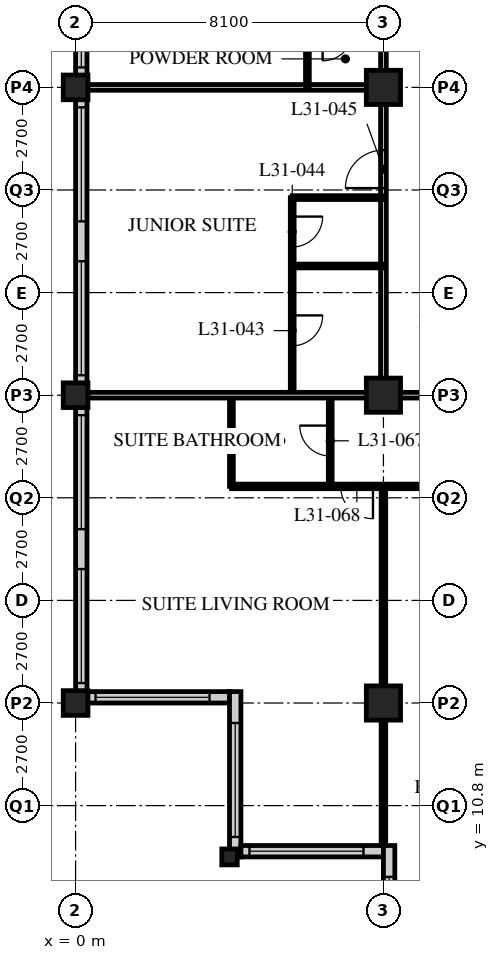
"""IFC4 building model, lengths in metres.
Left out: names, types, materials, properties, quantities, classifications, styles, units other than length and angle.
Written with IfcOpenShell. Run it as: python <this file> out.ifc"""

import sys

from ifc_helpers import new_model, si_unit, direction, frame, frame_2d, origin, origin_2d, place, context, subcontext, project, spatial, rectangle, hollow_rectangle, i_section, extrude, element, fill, save


model = new_model("IFC4")
c1 = context("Model", 3, precision=1e-05, world=origin(), true_north=direction((0.0, 1.0)))
c2 = subcontext(c1, "Body", "Model", "MODEL_VIEW")
j1 = project(units=[si_unit("LENGTHUNIT", "METRE"), si_unit("PLANEANGLEUNIT", "RADIAN")], contexts=[c1])
p1 = place(None, origin())
s1 = spatial("IfcSite", under=j1, at=p1, CompositionType="ELEMENT")
p2 = place(p1, origin())
s2 = spatial("IfcBuilding", under=s1, at=p2, CompositionType="ELEMENT")
p3 = place(p2, frame((0.0, 0.0, 123.8)))
s3 = spatial("IfcBuildingStorey", under=s2, at=p3, CompositionType="ELEMENT", Elevation=123.8)
for number, where, z_axis, x_axis in (
    (1, (0.0, 13.5, 0.0), (0.0, 0.0, 1.0), (1.0, 0.0, 0.0)),
    (2, (0.0, 21.6, 0.0), (0.0, 0.0, 1.0), (1.0, 0.0, 0.0)),
    (3, (0.0, 29.7, 0.0), (0.0, 0.0, 1.0), (1.0, 0.0, 0.0)),
):
    element("IfcColumn", number, at=place(p3, frame(where, z_axis=z_axis, x_axis=x_axis)), inside=s3, PredefinedType="COLUMN", context=c2, shape_type="SweptSolid", body=[
        extrude(hollow_rectangle(XDim=0.65, YDim=0.65, WallThickness=0.055, at=origin_2d()), origin(), (0.0, 0.0, 1.0), 3.4),
    ])
p4 = place(p3, frame((4.05, 9.45, 0.0), z_axis=(0.0, 0.0, 1.0), x_axis=(1.0, 0.0, 0.0)))
e4 = element("IfcColumn", 4, at=p4, inside=s3, PredefinedType="COLUMN", context=c2, shape_type="SweptSolid", body=[
    extrude(i_section(OverallWidth=0.407, OverallDepth=0.419, WebThickness=0.031, FlangeThickness=0.049, FilletRadius=0.015, at=origin_2d()), origin(), (0.0, 0.0, 1.0), 3.4),
])
for number, where, z_axis, x_axis in (
    (5, (8.1, 13.5, 0.0), (0.0, 0.0, 1.0), (1.0, 0.0, 0.0)),
    (6, (8.1, 21.6, 0.0), (0.0, 0.0, 1.0), (1.0, 0.0, 0.0)),
    (7, (8.1, 29.7, 0.0), (0.0, 0.0, 1.0), (1.0, 0.0, 0.0)),
):
    element("IfcColumn", number, at=place(p3, frame(where, z_axis=z_axis, x_axis=x_axis)), inside=s3, PredefinedType="COLUMN", context=c2, shape_type="SweptSolid", body=[
        extrude(hollow_rectangle(XDim=0.9, YDim=0.9, WallThickness=0.09, at=origin_2d()), origin(), (0.0, 0.0, 1.0), 3.4),
    ])
p5 = place(p3, frame((0.15, 45.6, 0.0), z_axis=(0.0, 0.0, 1.0), x_axis=(0.0, -1.0, 0.0)))
e8 = element("IfcWall", 8, at=p5, inside=s3, PredefinedType="SOLIDWALL", context=c2, shape_type="SweptSolid", body=[
    extrude(rectangle(XDim=32.1, YDim=0.3, at=frame_2d((16.05, 0.0))), origin(), (0.0, 0.0, 1.0), 3.19),
])
p6 = place(p5, frame((0.225, 0.0, 0.9)))
e9 = element("IfcOpeningElement", 9, at=p6, cuts=e8, PredefinedType="OPENING", context=c2, shape_type="SweptSolid", body=[
    extrude(rectangle(XDim=3.0, YDim=2.0, at=frame_2d((1.5, 1.0))), frame((0.0, 0.16, 0.0), z_axis=(0.0, -1.0, 0.0), x_axis=(1.0, 0.0, 0.0)), (0.0, 0.0, 1.0), 0.32),
])
p7 = place(p5, frame((4.275, 0.0, 0.9)))
e10 = element("IfcOpeningElement", 10, at=p7, cuts=e8, PredefinedType="OPENING", context=c2, shape_type="SweptSolid", body=[
    extrude(rectangle(XDim=3.0, YDim=2.0, at=frame_2d((1.5, 1.0))), frame((0.0, 0.16, 0.0), z_axis=(0.0, -1.0, 0.0), x_axis=(1.0, 0.0, 0.0)), (0.0, 0.0, 1.0), 0.32),
])
p8 = place(p5, frame((8.325, 0.0, 0.9)))
e11 = element("IfcOpeningElement", 11, at=p8, cuts=e8, PredefinedType="OPENING", context=c2, shape_type="SweptSolid", body=[
    extrude(rectangle(XDim=3.0, YDim=2.0, at=frame_2d((1.5, 1.0))), frame((0.0, 0.16, 0.0), z_axis=(0.0, -1.0, 0.0), x_axis=(1.0, 0.0, 0.0)), (0.0, 0.0, 1.0), 0.32),
])
p9 = place(p5, frame((12.375, 0.0, 0.9)))
e12 = element("IfcOpeningElement", 12, at=p9, cuts=e8, PredefinedType="OPENING", context=c2, shape_type="SweptSolid", body=[
    extrude(rectangle(XDim=3.0, YDim=2.0, at=frame_2d((1.5, 1.0))), frame((0.0, 0.16, 0.0), z_axis=(0.0, -1.0, 0.0), x_axis=(1.0, 0.0, 0.0)), (0.0, 0.0, 1.0), 0.32),
])
p10 = place(p5, frame((16.425, 0.0, 0.9)))
e13 = element("IfcOpeningElement", 13, at=p10, cuts=e8, PredefinedType="OPENING", context=c2, shape_type="SweptSolid", body=[
    extrude(rectangle(XDim=3.0, YDim=2.0, at=frame_2d((1.5, 1.0))), frame((0.0, 0.16, 0.0), z_axis=(0.0, -1.0, 0.0), x_axis=(1.0, 0.0, 0.0)), (0.0, 0.0, 1.0), 0.32),
])
p11 = place(p5, frame((20.475, 0.0, 0.9)))
e14 = element("IfcOpeningElement", 14, at=p11, cuts=e8, PredefinedType="OPENING", context=c2, shape_type="SweptSolid", body=[
    extrude(rectangle(XDim=3.0, YDim=2.0, at=frame_2d((1.5, 1.0))), frame((0.0, 0.16, 0.0), z_axis=(0.0, -1.0, 0.0), x_axis=(1.0, 0.0, 0.0)), (0.0, 0.0, 1.0), 0.32),
])
p12 = place(p5, frame((24.525, 0.0, 0.9)))
e15 = element("IfcOpeningElement", 15, at=p12, cuts=e8, PredefinedType="OPENING", context=c2, shape_type="SweptSolid", body=[
    extrude(rectangle(XDim=3.0, YDim=2.0, at=frame_2d((1.5, 1.0))), frame((0.0, 0.16, 0.0), z_axis=(0.0, -1.0, 0.0), x_axis=(1.0, 0.0, 0.0)), (0.0, 0.0, 1.0), 0.32),
])
p13 = place(p5, frame((28.575, 0.0, 0.9)))
e16 = element("IfcOpeningElement", 16, at=p13, cuts=e8, PredefinedType="OPENING", context=c2, shape_type="SweptSolid", body=[
    extrude(rectangle(XDim=3.0, YDim=2.0, at=frame_2d((1.5, 1.0))), frame((0.0, 0.16, 0.0), z_axis=(0.0, -1.0, 0.0), x_axis=(1.0, 0.0, 0.0)), (0.0, 0.0, 1.0), 0.32),
])
p14 = place(p3, frame((0.3, 13.65, 0.0), z_axis=(0.0, 0.0, 1.0), x_axis=(1.0, 0.0, 0.0)))
e17 = element("IfcWall", 17, at=p14, inside=s3, PredefinedType="SOLIDWALL", context=c2, shape_type="SweptSolid", body=[
    extrude(rectangle(XDim=3.75, YDim=0.3, at=frame_2d((1.875, 0.0))), origin(), (0.0, 0.0, 1.0), 3.19),
])
p15 = place(p14, frame((0.225, 0.0, 0.9)))
e18 = element("IfcOpeningElement", 18, at=p15, cuts=e17, PredefinedType="OPENING", context=c2, shape_type="SweptSolid", body=[
    extrude(rectangle(XDim=3.0, YDim=1.5, at=frame_2d((1.5, 0.75))), frame((0.0, 0.16, 0.0), z_axis=(0.0, -1.0, 0.0), x_axis=(1.0, 0.0, 0.0)), (0.0, 0.0, 1.0), 0.32),
])
p16 = place(p3, frame((4.2, 13.8, 0.0), z_axis=(0.0, 0.0, 1.0), x_axis=(0.0, -1.0, 0.0)))
e19 = element("IfcWall", 19, at=p16, inside=s3, PredefinedType="SOLIDWALL", context=c2, shape_type="SweptSolid", body=[
    extrude(rectangle(XDim=4.35, YDim=0.3, at=frame_2d((2.175, 0.0))), origin(), (0.0, 0.0, 1.0), 3.19),
])
p17 = place(p16, frame((0.825, 0.0, 0.9)))
e20 = element("IfcOpeningElement", 20, at=p17, cuts=e19, PredefinedType="OPENING", context=c2, shape_type="SweptSolid", body=[
    extrude(rectangle(XDim=3.0, YDim=1.5, at=frame_2d((1.5, 0.75))), frame((0.0, 0.16, 0.0), z_axis=(0.0, -1.0, 0.0), x_axis=(1.0, 0.0, 0.0)), (0.0, 0.0, 1.0), 0.32),
])
p18 = place(p3, frame((4.35, 9.6, 0.0), z_axis=(0.0, 0.0, 1.0), x_axis=(1.0, 0.0, 0.0)))
e21 = element("IfcWall", 21, at=p18, inside=s3, PredefinedType="SOLIDWALL", context=c2, shape_type="SweptSolid", body=[
    extrude(rectangle(XDim=3.75, YDim=0.3, at=frame_2d((1.875, 0.0))), origin(), (0.0, 0.0, 1.0), 3.19),
])
p19 = place(p18, frame((0.225, 0.0, 0.9)))
e22 = element("IfcOpeningElement", 22, at=p19, cuts=e21, PredefinedType="OPENING", context=c2, shape_type="SweptSolid", body=[
    extrude(rectangle(XDim=3.0, YDim=1.5, at=frame_2d((1.5, 0.75))), frame((0.0, 0.16, 0.0), z_axis=(0.0, -1.0, 0.0), x_axis=(1.0, 0.0, 0.0)), (0.0, 0.0, 1.0), 0.32),
])
p20 = place(p3, frame((8.25, 9.75, 0.0), z_axis=(0.0, 0.0, 1.0), x_axis=(0.0, -1.0, 0.0)))
e23 = element("IfcWall", 23, at=p20, inside=s3, PredefinedType="SOLIDWALL", context=c2, shape_type="SweptSolid", body=[
    extrude(rectangle(XDim=4.35, YDim=0.3, at=frame_2d((2.175, 0.0))), origin(), (0.0, 0.0, 1.0), 3.19),
])
p21 = place(p20, frame((0.825, 0.0, 0.9)))
e24 = element("IfcOpeningElement", 24, at=p21, cuts=e23, PredefinedType="OPENING", context=c2, shape_type="SweptSolid", body=[
    extrude(rectangle(XDim=3.0, YDim=1.5, at=frame_2d((1.5, 0.75))), frame((0.0, 0.16, 0.0), z_axis=(0.0, -1.0, 0.0), x_axis=(1.0, 0.0, 0.0)), (0.0, 0.0, 1.0), 0.32),
])
p22 = place(p3, frame((8.1, 21.6, 0.0), z_axis=(0.0, 0.0, 1.0), x_axis=(1.0, 0.0, 0.0)))
e25 = element("IfcWall", 25, at=p22, inside=s3, PredefinedType="PARTITIONING", context=c2, shape_type="SweptSolid", body=[
    extrude(rectangle(XDim=40.5, YDim=0.15, at=frame_2d((20.25, 0.0))), origin(), (0.0, 0.0, 1.0), 2.578),
])
p23 = place(p22, frame((9.625, 0.0, 0.0)))
e26 = element("IfcOpeningElement", 26, at=p23, cuts=e25, PredefinedType="OPENING", context=c2, shape_type="SweptSolid", body=[
    extrude(rectangle(XDim=1.0, YDim=2.1, at=frame_2d((0.5, 1.05))), frame((0.0, 0.085, 0.0), z_axis=(0.0, -1.0, 0.0), x_axis=(1.0, 0.0, 0.0)), (0.0, 0.0, 1.0), 0.17),
])
p24 = place(p22, frame((21.775, 0.0, 0.0)))
e27 = element("IfcOpeningElement", 27, at=p24, cuts=e25, PredefinedType="OPENING", context=c2, shape_type="SweptSolid", body=[
    extrude(rectangle(XDim=1.0, YDim=2.1, at=frame_2d((0.5, 1.05))), frame((0.0, 0.085, 0.0), z_axis=(0.0, -1.0, 0.0), x_axis=(1.0, 0.0, 0.0)), (0.0, 0.0, 1.0), 0.17),
])
p25 = place(p22, frame((28.95, 0.0, 0.0)))
e28 = element("IfcOpeningElement", 28, at=p25, cuts=e25, PredefinedType="OPENING", context=c2, shape_type="SweptSolid", body=[
    extrude(rectangle(XDim=1.0, YDim=2.1, at=frame_2d((0.5, 1.05))), frame((0.0, 0.085, 0.0), z_axis=(0.0, -1.0, 0.0), x_axis=(1.0, 0.0, 0.0)), (0.0, 0.0, 1.0), 0.17),
])
p26 = place(p22, frame((34.85, 0.0, 0.0)))
e29 = element("IfcOpeningElement", 29, at=p26, cuts=e25, PredefinedType="OPENING", context=c2, shape_type="SweptSolid", body=[
    extrude(rectangle(XDim=1.0, YDim=2.1, at=frame_2d((0.5, 1.05))), frame((0.0, 0.085, 0.0), z_axis=(0.0, -1.0, 0.0), x_axis=(1.0, 0.0, 0.0)), (0.0, 0.0, 1.0), 0.17),
])
p27 = place(p22, frame((1.525, 0.0, 0.0)))
e30 = element("IfcOpeningElement", 30, at=p27, cuts=e25, PredefinedType="OPENING", context=c2, shape_type="SweptSolid", body=[
    extrude(rectangle(XDim=1.0, YDim=2.1, at=frame_2d((0.5, 1.05))), frame((0.0, 0.085, 0.0), z_axis=(0.0, -1.0, 0.0), x_axis=(1.0, 0.0, 0.0)), (0.0, 0.0, 1.0), 0.17),
])
p28 = place(p22, frame((37.975, 0.0, 0.0)))
e31 = element("IfcOpeningElement", 31, at=p28, cuts=e25, PredefinedType="OPENING", context=c2, shape_type="SweptSolid", body=[
    extrude(rectangle(XDim=1.0, YDim=2.1, at=frame_2d((0.5, 1.05))), frame((0.0, 0.085, 0.0), z_axis=(0.0, -1.0, 0.0), x_axis=(1.0, 0.0, 0.0)), (0.0, 0.0, 1.0), 0.17),
])
p29 = place(p3, frame((8.1, 21.6, 0.0), z_axis=(0.0, 0.0, 1.0), x_axis=(0.0, 1.0, 0.0)))
e32 = element("IfcWall", 32, at=p29, inside=s3, PredefinedType="PARTITIONING", context=c2, shape_type="SweptSolid", body=[
    extrude(rectangle(XDim=24.3, YDim=0.15, at=frame_2d((12.15, 0.0))), origin(), (0.0, 0.0, 1.0), 2.578),
])
p30 = place(p29, frame((5.45, 0.0, 0.0)))
e33 = element("IfcOpeningElement", 33, at=p30, cuts=e32, PredefinedType="OPENING", context=c2, shape_type="SweptSolid", body=[
    extrude(rectangle(XDim=1.0, YDim=2.1, at=frame_2d((0.5, 1.05))), frame((0.0, 0.085, 0.0), z_axis=(0.0, -1.0, 0.0), x_axis=(1.0, 0.0, 0.0)), (0.0, 0.0, 1.0), 0.17),
])
p31 = place(p29, frame((10.0, 0.0, 0.0)))
e34 = element("IfcOpeningElement", 34, at=p31, cuts=e32, PredefinedType="OPENING", context=c2, shape_type="SweptSolid", body=[
    extrude(rectangle(XDim=1.0, YDim=2.1, at=frame_2d((0.5, 1.05))), frame((0.0, 0.085, 0.0), z_axis=(0.0, -1.0, 0.0), x_axis=(1.0, 0.0, 0.0)), (0.0, 0.0, 1.0), 0.17),
])
p32 = place(p29, frame((21.65, 0.0, 0.0)))
e35 = element("IfcOpeningElement", 35, at=p32, cuts=e32, PredefinedType="OPENING", context=c2, shape_type="SweptSolid", body=[
    extrude(rectangle(XDim=1.0, YDim=2.1, at=frame_2d((0.5, 1.05))), frame((0.0, 0.085, 0.0), z_axis=(0.0, -1.0, 0.0), x_axis=(1.0, 0.0, 0.0)), (0.0, 0.0, 1.0), 0.17),
])
p33 = place(p3, frame((5.7, 21.6, 0.0), z_axis=(0.0, 0.0, 1.0), x_axis=(0.0, 1.0, 0.0)))
e36 = element("IfcWall", 36, at=p33, inside=s3, PredefinedType="PARTITIONING", context=c2, shape_type="SweptSolid", body=[
    extrude(rectangle(XDim=5.2, YDim=0.1, at=frame_2d((2.6, 0.0))), origin(), (0.0, 0.0, 1.0), 3.19),
])
p34 = place(p33, frame((1.3, 0.0, 0.0)))
e37 = element("IfcOpeningElement", 37, at=p34, cuts=e36, PredefinedType="OPENING", context=c2, shape_type="SweptSolid", body=[
    extrude(rectangle(XDim=0.8, YDim=2.1, at=frame_2d((0.4, 1.05))), frame((0.0, 0.06, 0.0), z_axis=(0.0, -1.0, 0.0), x_axis=(1.0, 0.0, 0.0)), (0.0, 0.0, 1.0), 0.12),
])
p35 = place(p33, frame((3.9, 0.0, 0.0)))
e38 = element("IfcOpeningElement", 38, at=p35, cuts=e36, PredefinedType="OPENING", context=c2, shape_type="SweptSolid", body=[
    extrude(rectangle(XDim=0.8, YDim=2.1, at=frame_2d((0.4, 1.05))), frame((0.0, 0.06, 0.0), z_axis=(0.0, -1.0, 0.0), x_axis=(1.0, 0.0, 0.0)), (0.0, 0.0, 1.0), 0.12),
])
for number, where, z_axis, x_axis in (
    (39, (8.1, 25.0, 0.0), (0.0, 0.0, 1.0), (-1.0, 0.0, 0.0)),
    (40, (8.1, 26.8, 0.0), (0.0, 0.0, 1.0), (-1.0, 0.0, 0.0)),
):
    element("IfcWall", number, at=place(p3, frame(where, z_axis=z_axis, x_axis=x_axis)), inside=s3, PredefinedType="PARTITIONING", context=c2, shape_type="SweptSolid", body=[
        extrude(rectangle(XDim=2.4, YDim=0.1, at=frame_2d((1.2, 0.0))), origin(), (0.0, 0.0, 1.0), 3.19),
    ])
p36 = place(p3, frame((8.1, 29.7, 0.0), z_axis=(0.0, 0.0, 1.0), x_axis=(-1.0, 0.0, 0.0)))
e41 = element("IfcWall", 41, at=p36, inside=s3, PredefinedType="PARTITIONING", context=c2, shape_type="SweptSolid", body=[
    extrude(rectangle(XDim=7.8, YDim=0.15, at=frame_2d((3.9, 0.0))), origin(), (0.0, 0.0, 1.0), 2.578),
])
p37 = place(p3, frame((6.1, 29.7, 0.0), z_axis=(0.0, 0.0, 1.0), x_axis=(0.0, 1.0, 0.0)))
e42 = element("IfcWall", 42, at=p37, inside=s3, PredefinedType="PARTITIONING", context=c2, shape_type="SweptSolid", body=[
    extrude(rectangle(XDim=1.5, YDim=0.1, at=frame_2d((0.75, 0.0))), origin(), (0.0, 0.0, 1.0), 3.19),
])
p38 = place(p3, frame((6.7, 21.6, 0.0), z_axis=(0.0, 0.0, 1.0), x_axis=(0.0, -1.0, 0.0)))
e43 = element("IfcWall", 43, at=p38, inside=s3, PredefinedType="PARTITIONING", context=c2, shape_type="SweptSolid", body=[
    extrude(rectangle(XDim=2.4, YDim=0.1, at=frame_2d((1.2, 0.0))), origin(), (0.0, 0.0, 1.0), 3.19),
])
p39 = place(p38, frame((0.8, 0.0, 0.0)))
e44 = element("IfcOpeningElement", 44, at=p39, cuts=e43, PredefinedType="OPENING", context=c2, shape_type="SweptSolid", body=[
    extrude(rectangle(XDim=0.8, YDim=2.1, at=frame_2d((0.4, 1.05))), frame((0.0, 0.06, 0.0), z_axis=(0.0, -1.0, 0.0), x_axis=(1.0, 0.0, 0.0)), (0.0, 0.0, 1.0), 0.12),
])
p40 = place(p3, frame((4.1, 21.6, 0.0), z_axis=(0.0, 0.0, 1.0), x_axis=(0.0, -1.0, 0.0)))
e45 = element("IfcWall", 45, at=p40, inside=s3, PredefinedType="PARTITIONING", context=c2, shape_type="SweptSolid", body=[
    extrude(rectangle(XDim=2.4, YDim=0.1, at=frame_2d((1.2, 0.0))), origin(), (0.0, 0.0, 1.0), 3.19),
])
p41 = place(p3, frame((4.1, 19.2, 0.0), z_axis=(0.0, 0.0, 1.0), x_axis=(1.0, 0.0, 0.0)))
e46 = element("IfcWall", 46, at=p41, inside=s3, PredefinedType="PARTITIONING", context=c2, shape_type="SweptSolid", body=[
    extrude(rectangle(XDim=8.05, YDim=0.12, at=frame_2d((4.025, 0.0))), origin(), (0.0, 0.0, 1.0), 3.19),
])
p42 = place(p41, frame((6.725, 0.0, 0.0)))
e47 = element("IfcOpeningElement", 47, at=p42, cuts=e46, PredefinedType="OPENING", context=c2, shape_type="SweptSolid", body=[
    extrude(rectangle(XDim=0.85, YDim=2.1, at=frame_2d((0.425, 1.05))), frame((0.0, 0.07, 0.0), z_axis=(0.0, -1.0, 0.0), x_axis=(1.0, 0.0, 0.0)), (0.0, 0.0, 1.0), 0.14),
])
p43 = place(p41, frame((2.875, 0.0, 0.0)))
e48 = element("IfcOpeningElement", 48, at=p43, cuts=e46, PredefinedType="OPENING", context=c2, shape_type="SweptSolid", body=[
    extrude(rectangle(XDim=0.85, YDim=2.1, at=frame_2d((0.425, 1.05))), frame((0.0, 0.07, 0.0), z_axis=(0.0, -1.0, 0.0), x_axis=(1.0, 0.0, 0.0)), (0.0, 0.0, 1.0), 0.14),
])
p44 = place(p3, frame((8.1, 19.2, 0.0), z_axis=(0.0, 0.0, 1.0), x_axis=(0.0, -1.0, 0.0)))
e49 = element("IfcWall", 49, at=p44, inside=s3, PredefinedType="PARTITIONING", context=c2, shape_type="SweptSolid", body=[
    extrude(rectangle(XDim=9.45, YDim=0.12, at=frame_2d((4.725, 0.0))), origin(), (0.0, 0.0, 1.0), 2.578),
])
p45 = place(p3, frame((0.3, 21.6, 0.0), z_axis=(0.0, 0.0, 1.0), x_axis=(1.0, 0.0, 0.0)))
e50 = element("IfcWall", 50, at=p45, inside=s3, PredefinedType="PARTITIONING", context=c2, shape_type="SweptSolid", body=[
    extrude(rectangle(XDim=7.8, YDim=0.15, at=frame_2d((3.9, 0.0))), origin(), (0.0, 0.0, 1.0), 2.578),
])
p46 = place(p9, origin())
e51 = element("IfcWindow", 51, at=p46, inside=s3, PartitioningType="SINGLE_PANEL", PredefinedType="WINDOW", context=c2, shape_type="SweptSolid", body=[
    extrude(rectangle(XDim=3.0, YDim=2.0, at=frame_2d((1.5, 1.0))), frame((0.0, 0.03, 0.0), z_axis=(0.0, -1.0, 0.0), x_axis=(1.0, 0.0, 0.0)), (0.0, 0.0, 1.0), 0.06),
])
fill(e12, e51)
p47 = place(p10, origin())
e52 = element("IfcWindow", 52, at=p47, inside=s3, PartitioningType="SINGLE_PANEL", PredefinedType="WINDOW", context=c2, shape_type="SweptSolid", body=[
    extrude(rectangle(XDim=3.0, YDim=2.0, at=frame_2d((1.5, 1.0))), frame((0.0, 0.03, 0.0), z_axis=(0.0, -1.0, 0.0), x_axis=(1.0, 0.0, 0.0)), (0.0, 0.0, 1.0), 0.06),
])
fill(e13, e52)
p48 = place(p11, origin())
e53 = element("IfcWindow", 53, at=p48, inside=s3, PartitioningType="SINGLE_PANEL", PredefinedType="WINDOW", context=c2, shape_type="SweptSolid", body=[
    extrude(rectangle(XDim=3.0, YDim=2.0, at=frame_2d((1.5, 1.0))), frame((0.0, 0.03, 0.0), z_axis=(0.0, -1.0, 0.0), x_axis=(1.0, 0.0, 0.0)), (0.0, 0.0, 1.0), 0.06),
])
fill(e14, e53)
p49 = place(p12, origin())
e54 = element("IfcWindow", 54, at=p49, inside=s3, PartitioningType="SINGLE_PANEL", PredefinedType="WINDOW", context=c2, shape_type="SweptSolid", body=[
    extrude(rectangle(XDim=3.0, YDim=2.0, at=frame_2d((1.5, 1.0))), frame((0.0, 0.03, 0.0), z_axis=(0.0, -1.0, 0.0), x_axis=(1.0, 0.0, 0.0)), (0.0, 0.0, 1.0), 0.06),
])
fill(e15, e54)
p50 = place(p13, origin())
e55 = element("IfcWindow", 55, at=p50, inside=s3, PartitioningType="SINGLE_PANEL", PredefinedType="WINDOW", context=c2, shape_type="SweptSolid", body=[
    extrude(rectangle(XDim=3.0, YDim=2.0, at=frame_2d((1.5, 1.0))), frame((0.0, 0.03, 0.0), z_axis=(0.0, -1.0, 0.0), x_axis=(1.0, 0.0, 0.0)), (0.0, 0.0, 1.0), 0.06),
])
fill(e16, e55)
p51 = place(p15, origin())
e56 = element("IfcWindow", 56, at=p51, inside=s3, PartitioningType="SINGLE_PANEL", PredefinedType="WINDOW", context=c2, shape_type="SweptSolid", body=[
    extrude(rectangle(XDim=3.0, YDim=1.5, at=frame_2d((1.5, 0.75))), frame((0.0, 0.03, 0.0), z_axis=(0.0, -1.0, 0.0), x_axis=(1.0, 0.0, 0.0)), (0.0, 0.0, 1.0), 0.06),
])
fill(e18, e56)
p52 = place(p17, origin())
e57 = element("IfcWindow", 57, at=p52, inside=s3, PartitioningType="SINGLE_PANEL", PredefinedType="WINDOW", context=c2, shape_type="SweptSolid", body=[
    extrude(rectangle(XDim=3.0, YDim=1.5, at=frame_2d((1.5, 0.75))), frame((0.0, 0.03, 0.0), z_axis=(0.0, -1.0, 0.0), x_axis=(1.0, 0.0, 0.0)), (0.0, 0.0, 1.0), 0.06),
])
fill(e20, e57)
p53 = place(p19, origin())
e58 = element("IfcWindow", 58, at=p53, inside=s3, PartitioningType="SINGLE_PANEL", PredefinedType="WINDOW", context=c2, shape_type="SweptSolid", body=[
    extrude(rectangle(XDim=3.0, YDim=1.5, at=frame_2d((1.5, 0.75))), frame((0.0, 0.03, 0.0), z_axis=(0.0, -1.0, 0.0), x_axis=(1.0, 0.0, 0.0)), (0.0, 0.0, 1.0), 0.06),
])
fill(e22, e58)
p54 = place(p21, origin())
e59 = element("IfcWindow", 59, at=p54, inside=s3, PartitioningType="SINGLE_PANEL", PredefinedType="WINDOW", context=c2, shape_type="SweptSolid", body=[
    extrude(rectangle(XDim=3.0, YDim=1.5, at=frame_2d((1.5, 0.75))), frame((0.0, 0.03, 0.0), z_axis=(0.0, -1.0, 0.0), x_axis=(1.0, 0.0, 0.0)), (0.0, 0.0, 1.0), 0.06),
])
fill(e24, e59)
p55 = place(p34, origin())
e60 = element("IfcDoor", 60, at=p55, inside=s3, OperationType="SINGLE_SWING_LEFT", PredefinedType="DOOR", context=c2, shape_type="SweptSolid", body=[
    extrude(rectangle(XDim=0.8, YDim=2.1, at=frame_2d((0.4, 1.05))), frame((0.0, 0.025, 0.0), z_axis=(0.0, -1.0, 0.0), x_axis=(1.0, 0.0, 0.0)), (0.0, 0.0, 1.0), 0.05),
])
fill(e37, e60)
p56 = place(p35, origin())
e61 = element("IfcDoor", 61, at=p56, inside=s3, OperationType="SINGLE_SWING_LEFT", PredefinedType="DOOR", context=c2, shape_type="SweptSolid", body=[
    extrude(rectangle(XDim=0.8, YDim=2.1, at=frame_2d((0.4, 1.05))), frame((0.0, 0.025, 0.0), z_axis=(0.0, -1.0, 0.0), x_axis=(1.0, 0.0, 0.0)), (0.0, 0.0, 1.0), 0.05),
])
fill(e38, e61)
p57 = place(p30, origin())
e62 = element("IfcDoor", 62, at=p57, inside=s3, OperationType="SINGLE_SWING_LEFT", PredefinedType="DOOR", context=c2, shape_type="SweptSolid", body=[
    extrude(rectangle(XDim=1.0, YDim=2.1, at=frame_2d((0.5, 1.05))), frame((0.0, 0.025, 0.0), z_axis=(0.0, -1.0, 0.0), x_axis=(1.0, 0.0, 0.0)), (0.0, 0.0, 1.0), 0.05),
])
fill(e33, e62)
p58 = place(p39, origin())
e63 = element("IfcDoor", 63, at=p58, inside=s3, OperationType="SINGLE_SWING_RIGHT", PredefinedType="DOOR", context=c2, shape_type="SweptSolid", body=[
    extrude(rectangle(XDim=0.8, YDim=2.1, at=frame_2d((0.4, 1.05))), frame((0.0, 0.025, 0.0), z_axis=(0.0, -1.0, 0.0), x_axis=(1.0, 0.0, 0.0)), (0.0, 0.0, 1.0), 0.05),
])
fill(e44, e63)
p59 = place(p43, origin())
e64 = element("IfcDoor", 64, at=p59, inside=s3, OperationType="SINGLE_SWING_LEFT", PredefinedType="DOOR", context=c2, shape_type="SweptSolid", body=[
    extrude(rectangle(XDim=0.85, YDim=2.1, at=frame_2d((0.425, 1.05))), frame((0.0, 0.025, 0.0), z_axis=(0.0, -1.0, 0.0), x_axis=(1.0, 0.0, 0.0)), (0.0, 0.0, 1.0), 0.05),
])
fill(e48, e64)
save(model, sys.argv[1])
